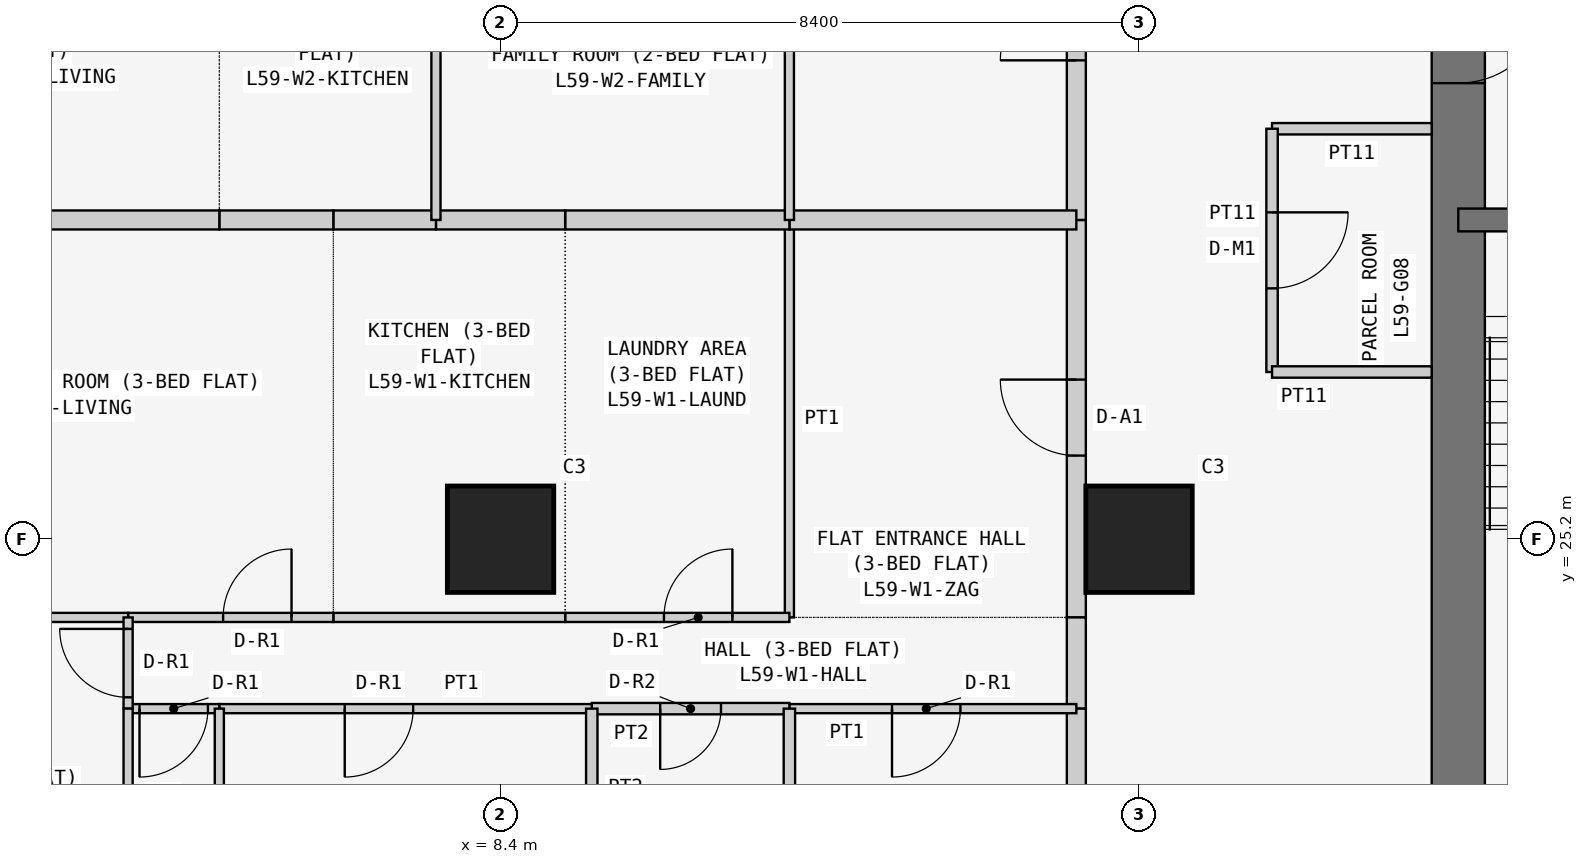
"""IFC4 building model, lengths in metres.
Left out: names, types, materials, properties, quantities, classifications, styles, units other than length and angle.
Written with IfcOpenShell. Run it as: python <this file> out.ifc"""

import sys

from ifc_helpers import new_model, si_unit, direction, frame, frame_2d, origin, origin_2d, place, context, subcontext, project, spatial, rectangle, extrude, element, fill, save


model = new_model("IFC4")
c1 = context("Model", 3, precision=1e-05, world=origin(), true_north=direction((0.0, 1.0)))
c2 = subcontext(c1, "Body", "Model", "MODEL_VIEW")
j1 = project(units=[si_unit("LENGTHUNIT", "METRE"), si_unit("PLANEANGLEUNIT", "RADIAN")], contexts=[c1])
p1 = place(None, origin())
s1 = spatial("IfcSite", under=j1, at=p1, CompositionType="ELEMENT")
p2 = place(p1, origin())
s2 = spatial("IfcBuilding", under=s1, at=p2, CompositionType="ELEMENT")
p3 = place(p2, frame((0.0, 0.0, 226.5)))
s3 = spatial("IfcBuildingStorey", under=s2, at=p3, CompositionType="ELEMENT", Elevation=226.5)
for number, where, z_axis, x_axis in (
    (1, (8.4, 25.2, 0.0), (0.0, 0.0, 1.0), (1.0, 0.0, 0.0)),
    (2, (16.8, 25.2, 0.0), (0.0, 0.0, 1.0), (1.0, 0.0, 0.0)),
):
    element("IfcColumn", number, at=place(p3, frame(where, z_axis=z_axis, x_axis=x_axis)), inside=s3, PredefinedType="COLUMN", context=c2, shape_type="SweptSolid", body=[
        extrude(rectangle(XDim=1.4, YDim=1.4, at=origin_2d()), origin(), (0.0, 0.0, 1.0), 3.6),
    ])
p4 = place(p3, frame((21.0, 37.8, 0.0), z_axis=(0.0, 0.0, 1.0), x_axis=(0.0, -1.0, 0.0)))
e3 = element("IfcWall", 3, at=p4, inside=s3, PredefinedType="SHEAR", context=c2, shape_type="SweptSolid", body=[
    extrude(rectangle(XDim=17.15, YDim=0.7, at=frame_2d((8.575, 0.0))), origin(), (0.0, 0.0, 1.0), 3.6),
])
p5 = place(p4, frame((5.4, 0.0, 0.0)))
e4 = element("IfcOpeningElement", 4, at=p5, cuts=e3, PredefinedType="OPENING", context=c2, shape_type="SweptSolid", body=[
    extrude(rectangle(XDim=1.2, YDim=2.1, at=frame_2d((0.6, 1.05))), frame((0.0, 0.36, 0.0), z_axis=(0.0, -1.0, 0.0), x_axis=(1.0, 0.0, 0.0)), (0.0, 0.0, 1.0), 0.72),
])
p6 = place(p3, frame((21.0, 29.4, 0.0), z_axis=(0.0, 0.0, 1.0), x_axis=(1.0, 0.0, 0.0)))
e5 = element("IfcWall", 5, at=p6, inside=s3, PredefinedType="SHEAR", context=c2, shape_type="SweptSolid", body=[
    extrude(rectangle(XDim=5.6, YDim=0.3, at=frame_2d((2.8, 0.0))), origin(), (0.0, 0.0, 1.0), 3.6),
])
p7 = place(p6, frame((2.3, 0.0, 0.0)))
e6 = element("IfcOpeningElement", 6, at=p7, cuts=e5, PredefinedType="OPENING", context=c2, shape_type="SweptSolid", body=[
    extrude(rectangle(XDim=1.2, YDim=2.1, at=frame_2d((0.6, 1.05))), frame((0.0, 0.16, 0.0), z_axis=(0.0, -1.0, 0.0), x_axis=(1.0, 0.0, 0.0)), (0.0, 0.0, 1.0), 0.32),
])
p8 = place(p3, frame((20.65, 30.6, 0.0), z_axis=(0.0, 0.0, 1.0), x_axis=(-1.0, 0.0, 0.0)))
e7 = element("IfcWall", 7, at=p8, inside=s3, PredefinedType="PARTITIONING", context=c2, shape_type="SweptSolid", body=[
    extrude(rectangle(XDim=2.1, YDim=0.15, at=frame_2d((1.05, 0.0))), origin(), (0.0, 0.0, 1.0), 3.45),
])
p9 = place(p3, frame((18.55, 30.6, 0.0), z_axis=(0.0, 0.0, 1.0), x_axis=(0.0, -1.0, 0.0)))
e8 = element("IfcWall", 8, at=p9, inside=s3, PredefinedType="PARTITIONING", context=c2, shape_type="SweptSolid", body=[
    extrude(rectangle(XDim=3.2, YDim=0.15, at=frame_2d((1.6, 0.0))), origin(), (0.0, 0.0, 1.0), 3.45),
])
p10 = place(p9, frame((1.1, 0.0, 0.0)))
e9 = element("IfcOpeningElement", 9, at=p10, cuts=e8, PredefinedType="OPENING", context=c2, shape_type="SweptSolid", body=[
    extrude(rectangle(XDim=1.0, YDim=2.1, at=frame_2d((0.5, 1.05))), frame((0.0, 0.085, 0.0), z_axis=(0.0, -1.0, 0.0), x_axis=(1.0, 0.0, 0.0)), (0.0, 0.0, 1.0), 0.17),
])
p11 = place(p3, frame((18.55, 27.4, 0.0), z_axis=(0.0, 0.0, 1.0), x_axis=(1.0, 0.0, 0.0)))
e10 = element("IfcWall", 10, at=p11, inside=s3, PredefinedType="PARTITIONING", context=c2, shape_type="SweptSolid", body=[
    extrude(rectangle(XDim=2.1, YDim=0.15, at=frame_2d((1.05, 0.0))), origin(), (0.0, 0.0, 1.0), 3.45),
])
p12 = place(p3, frame((15.975, 24.171, 0.0), z_axis=(0.0, 0.0, 1.0), x_axis=(0.0, 1.0, 0.0)))
e11 = element("IfcWall", 11, at=p12, inside=s3, PredefinedType="PARTITIONING", context=c2, shape_type="SweptSolid", body=[
    extrude(rectangle(XDim=5.229, YDim=0.25, at=frame_2d((2.615, 0.0))), origin(), (0.0, 0.0, 1.0), 3.45),
])
p13 = place(p12, frame((2.129, 0.0, 0.0)))
e12 = element("IfcOpeningElement", 12, at=p13, cuts=e11, PredefinedType="OPENING", context=c2, shape_type="SweptSolid", body=[
    extrude(rectangle(XDim=1.0, YDim=2.1, at=frame_2d((0.5, 1.05))), frame((0.0, 0.135, 0.0), z_axis=(0.0, -1.0, 0.0), x_axis=(1.0, 0.0, 0.0)), (0.0, 0.0, 1.0), 0.27),
])
p14 = place(p3, frame((15.975, 22.971, 0.0), z_axis=(0.0, 0.0, 1.0), x_axis=(0.0, 1.0, 0.0)))
e13 = element("IfcWall", 13, at=p14, inside=s3, PredefinedType="PARTITIONING", context=c2, shape_type="SweptSolid", body=[
    extrude(rectangle(XDim=1.2, YDim=0.25, at=frame_2d((0.6, 0.0))), origin(), (0.0, 0.0, 1.0), 3.45),
])
p15 = place(p3, frame((15.975, 16.1, 0.0), z_axis=(0.0, 0.0, 1.0), x_axis=(0.0, 1.0, 0.0)))
e14 = element("IfcWall", 14, at=p15, inside=s3, PredefinedType="PARTITIONING", context=c2, shape_type="SweptSolid", body=[
    extrude(rectangle(XDim=6.871, YDim=0.25, at=frame_2d((3.436, 0.0))), origin(), (0.0, 0.0, 1.0), 3.45),
])
p16 = place(p3, frame((15.975, 29.4, 0.0), z_axis=(0.0, 0.0, 1.0), x_axis=(0.0, 1.0, 0.0)))
e15 = element("IfcWall", 15, at=p16, inside=s3, PredefinedType="PARTITIONING", context=c2, shape_type="SweptSolid", body=[
    extrude(rectangle(XDim=5.229, YDim=0.25, at=frame_2d((2.615, 0.0))), origin(), (0.0, 0.0, 1.0), 3.45),
])
p17 = place(p16, frame((2.1, 0.0, 0.0)))
e16 = element("IfcOpeningElement", 16, at=p17, cuts=e15, PredefinedType="OPENING", context=c2, shape_type="SweptSolid", body=[
    extrude(rectangle(XDim=1.0, YDim=2.1, at=frame_2d((0.5, 1.05))), frame((0.0, 0.135, 0.0), z_axis=(0.0, -1.0, 0.0), x_axis=(1.0, 0.0, 0.0)), (0.0, 0.0, 1.0), 0.27),
])
p18 = place(p3, frame((12.2, 29.4, 0.0), z_axis=(0.0, 0.0, 1.0), x_axis=(0.0, -1.0, 0.0)))
e17 = element("IfcWall", 17, at=p18, inside=s3, PredefinedType="PARTITIONING", context=c2, shape_type="SweptSolid", body=[
    extrude(rectangle(XDim=5.229, YDim=0.12, at=frame_2d((2.615, 0.0))), origin(), (0.0, 0.0, 1.0), 3.45),
])
p19 = place(p3, frame((15.975, 29.4, 0.0), z_axis=(0.0, 0.0, 1.0), x_axis=(-1.0, 0.0, 0.0)))
e18 = element("IfcWall", 18, at=p19, inside=s3, PredefinedType="PARTITIONING", context=c2, shape_type="SweptSolid", body=[
    extrude(rectangle(XDim=3.775, YDim=0.25, at=frame_2d((1.888, 0.0))), origin(), (0.0, 0.0, 1.0), 3.45),
])
p20 = place(p3, frame((9.25, 24.171, 0.0), z_axis=(0.0, 0.0, 1.0), x_axis=(1.0, 0.0, 0.0)))
e19 = element("IfcWall", 19, at=p20, inside=s3, PredefinedType="PARTITIONING", context=c2, shape_type="SweptSolid", body=[
    extrude(rectangle(XDim=2.95, YDim=0.12, at=frame_2d((1.475, 0.0))), origin(), (0.0, 0.0, 1.0), 3.45),
])
p21 = place(p20, frame((1.3, 0.0, 0.0)))
e20 = element("IfcOpeningElement", 20, at=p21, cuts=e19, PredefinedType="OPENING", context=c2, shape_type="SweptSolid", body=[
    extrude(rectangle(XDim=0.9, YDim=2.1, at=frame_2d((0.45, 1.05))), frame((0.0, 0.07, 0.0), z_axis=(0.0, -1.0, 0.0), x_axis=(1.0, 0.0, 0.0)), (0.0, 0.0, 1.0), 0.14),
])
p22 = place(p3, frame((12.2, 29.4, 0.0), z_axis=(0.0, 0.0, 1.0), x_axis=(-1.0, 0.0, 0.0)))
e21 = element("IfcWall", 21, at=p22, inside=s3, PredefinedType="PARTITIONING", context=c2, shape_type="SweptSolid", body=[
    extrude(rectangle(XDim=2.95, YDim=0.25, at=frame_2d((1.475, 0.0))), origin(), (0.0, 0.0, 1.0), 3.45),
])
p23 = place(p3, frame((6.2, 24.171, 0.0), z_axis=(0.0, 0.0, 1.0), x_axis=(1.0, 0.0, 0.0)))
e22 = element("IfcWall", 22, at=p23, inside=s3, PredefinedType="PARTITIONING", context=c2, shape_type="SweptSolid", body=[
    extrude(rectangle(XDim=3.05, YDim=0.12, at=frame_2d((1.525, 0.0))), origin(), (0.0, 0.0, 1.0), 3.45),
])
p24 = place(p3, frame((9.25, 29.4, 0.0), z_axis=(0.0, 0.0, 1.0), x_axis=(-1.0, 0.0, 0.0)))
e23 = element("IfcWall", 23, at=p24, inside=s3, PredefinedType="PARTITIONING", context=c2, shape_type="SweptSolid", body=[
    extrude(rectangle(XDim=1.7, YDim=0.25, at=frame_2d((0.85, 0.0))), origin(), (0.0, 0.0, 1.0), 3.45),
])
p25 = place(p3, frame((7.55, 29.4, 0.0), z_axis=(0.0, 0.0, 1.0), x_axis=(-1.0, 0.0, 0.0)))
e24 = element("IfcWall", 24, at=p25, inside=s3, PredefinedType="PARTITIONING", context=c2, shape_type="SweptSolid", body=[
    extrude(rectangle(XDim=1.35, YDim=0.25, at=frame_2d((0.675, 0.0))), origin(), (0.0, 0.0, 1.0), 3.45),
])
p26 = place(p3, frame((3.5, 24.171, 0.0), z_axis=(0.0, 0.0, 1.0), x_axis=(1.0, 0.0, 0.0)))
e25 = element("IfcWall", 25, at=p26, inside=s3, PredefinedType="PARTITIONING", context=c2, shape_type="SweptSolid", body=[
    extrude(rectangle(XDim=2.7, YDim=0.12, at=frame_2d((1.35, 0.0))), origin(), (0.0, 0.0, 1.0), 3.45),
])
p27 = place(p26, frame((1.25, 0.0, 0.0)))
e26 = element("IfcOpeningElement", 26, at=p27, cuts=e25, PredefinedType="OPENING", context=c2, shape_type="SweptSolid", body=[
    extrude(rectangle(XDim=0.9, YDim=2.1, at=frame_2d((0.45, 1.05))), frame((0.0, 0.07, 0.0), z_axis=(0.0, -1.0, 0.0), x_axis=(1.0, 0.0, 0.0)), (0.0, 0.0, 1.0), 0.14),
])
p28 = place(p3, frame((-0.65, 24.171, 0.0), z_axis=(0.0, 0.0, 1.0), x_axis=(1.0, 0.0, 0.0)))
e27 = element("IfcWall", 27, at=p28, inside=s3, PredefinedType="PARTITIONING", context=c2, shape_type="SweptSolid", body=[
    extrude(rectangle(XDim=4.15, YDim=0.12, at=frame_2d((2.075, 0.0))), origin(), (0.0, 0.0, 1.0), 3.45),
])
p29 = place(p3, frame((6.2, 29.4, 0.0), z_axis=(0.0, 0.0, 1.0), x_axis=(-1.0, 0.0, 0.0)))
e28 = element("IfcWall", 28, at=p29, inside=s3, PredefinedType="PARTITIONING", context=c2, shape_type="SweptSolid", body=[
    extrude(rectangle(XDim=1.5, YDim=0.25, at=frame_2d((0.75, 0.0))), origin(), (0.0, 0.0, 1.0), 3.45),
])
p30 = place(p3, frame((4.7, 29.4, 0.0), z_axis=(0.0, 0.0, 1.0), x_axis=(-1.0, 0.0, 0.0)))
e29 = element("IfcWall", 29, at=p30, inside=s3, PredefinedType="PARTITIONING", context=c2, shape_type="SweptSolid", body=[
    extrude(rectangle(XDim=5.35, YDim=0.25, at=frame_2d((2.675, 0.0))), origin(), (0.0, 0.0, 1.0), 3.45),
])
p31 = place(p3, frame((12.2, 22.971, 0.0), z_axis=(0.0, 0.0, 1.0), x_axis=(1.0, 0.0, 0.0)))
e30 = element("IfcWall", 30, at=p31, inside=s3, PredefinedType="PARTITIONING", context=c2, shape_type="SweptSolid", body=[
    extrude(rectangle(XDim=3.775, YDim=0.12, at=frame_2d((1.888, 0.0))), origin(), (0.0, 0.0, 1.0), 3.45),
])
p32 = place(p31, frame((1.35, 0.0, 0.0)))
e31 = element("IfcOpeningElement", 31, at=p32, cuts=e30, PredefinedType="OPENING", context=c2, shape_type="SweptSolid", body=[
    extrude(rectangle(XDim=0.9, YDim=2.1, at=frame_2d((0.45, 1.05))), frame((0.0, 0.07, 0.0), z_axis=(0.0, -1.0, 0.0), x_axis=(1.0, 0.0, 0.0)), (0.0, 0.0, 1.0), 0.14),
])
p33 = place(p3, frame((9.6, 22.971, 0.0), z_axis=(0.0, 0.0, 1.0), x_axis=(1.0, 0.0, 0.0)))
e32 = element("IfcWall", 32, at=p33, inside=s3, PredefinedType="PARTITIONING", context=c2, shape_type="SweptSolid", body=[
    extrude(rectangle(XDim=2.6, YDim=0.15, at=frame_2d((1.3, 0.0))), origin(), (0.0, 0.0, 1.0), 3.45),
])
p34 = place(p33, frame((0.9, 0.0, 0.0)))
e33 = element("IfcOpeningElement", 33, at=p34, cuts=e32, PredefinedType="OPENING", context=c2, shape_type="SweptSolid", body=[
    extrude(rectangle(XDim=0.8, YDim=2.1, at=frame_2d((0.4, 1.05))), frame((0.0, 0.085, 0.0), z_axis=(0.0, -1.0, 0.0), x_axis=(1.0, 0.0, 0.0)), (0.0, 0.0, 1.0), 0.17),
])
p35 = place(p3, frame((4.7, 22.971, 0.0), z_axis=(0.0, 0.0, 1.0), x_axis=(1.0, 0.0, 0.0)))
e34 = element("IfcWall", 34, at=p35, inside=s3, PredefinedType="PARTITIONING", context=c2, shape_type="SweptSolid", body=[
    extrude(rectangle(XDim=4.9, YDim=0.12, at=frame_2d((2.45, 0.0))), origin(), (0.0, 0.0, 1.0), 3.45),
])
p36 = place(p35, frame((1.65, 0.0, 0.0)))
e35 = element("IfcOpeningElement", 35, at=p36, cuts=e34, PredefinedType="OPENING", context=c2, shape_type="SweptSolid", body=[
    extrude(rectangle(XDim=0.9, YDim=2.1, at=frame_2d((0.45, 1.05))), frame((0.0, 0.07, 0.0), z_axis=(0.0, -1.0, 0.0), x_axis=(1.0, 0.0, 0.0)), (0.0, 0.0, 1.0), 0.14),
])
p37 = place(p3, frame((3.5, 22.971, 0.0), z_axis=(0.0, 0.0, 1.0), x_axis=(1.0, 0.0, 0.0)))
e36 = element("IfcWall", 36, at=p37, inside=s3, PredefinedType="PARTITIONING", context=c2, shape_type="SweptSolid", body=[
    extrude(rectangle(XDim=1.2, YDim=0.12, at=frame_2d((0.6, 0.0))), origin(), (0.0, 0.0, 1.0), 3.45),
])
p38 = place(p37, frame((0.15, 0.0, 0.0)))
e37 = element("IfcOpeningElement", 37, at=p38, cuts=e36, PredefinedType="OPENING", context=c2, shape_type="SweptSolid", body=[
    extrude(rectangle(XDim=0.9, YDim=2.1, at=frame_2d((0.45, 1.05))), frame((0.0, 0.07, 0.0), z_axis=(0.0, -1.0, 0.0), x_axis=(1.0, 0.0, 0.0)), (0.0, 0.0, 1.0), 0.14),
])
p39 = place(p3, frame((3.5, 24.171, 0.0), z_axis=(0.0, 0.0, 1.0), x_axis=(0.0, -1.0, 0.0)))
e38 = element("IfcWall", 38, at=p39, inside=s3, PredefinedType="PARTITIONING", context=c2, shape_type="SweptSolid", body=[
    extrude(rectangle(XDim=1.2, YDim=0.12, at=frame_2d((0.6, 0.0))), origin(), (0.0, 0.0, 1.0), 3.45),
])
p40 = place(p39, frame((0.151, 0.0, 0.0)))
e39 = element("IfcOpeningElement", 39, at=p40, cuts=e38, PredefinedType="OPENING", context=c2, shape_type="SweptSolid", body=[
    extrude(rectangle(XDim=0.9, YDim=2.1, at=frame_2d((0.45, 1.05))), frame((0.0, 0.07, 0.0), z_axis=(0.0, -1.0, 0.0), x_axis=(1.0, 0.0, 0.0)), (0.0, 0.0, 1.0), 0.14),
])
for number, where, z_axis, x_axis in (
    (40, (12.2, 22.971, 0.0), (0.0, 0.0, 1.0), (0.0, -1.0, 0.0)),
    (41, (9.6, 22.971, 0.0), (0.0, 0.0, 1.0), (0.0, -1.0, 0.0)),
):
    element("IfcWall", number, at=place(p3, frame(where, z_axis=z_axis, x_axis=x_axis)), inside=s3, PredefinedType="PARTITIONING", context=c2, shape_type="SweptSolid", body=[
        extrude(rectangle(XDim=2.971, YDim=0.15, at=frame_2d((1.485, 0.0))), origin(), (0.0, 0.0, 1.0), 3.45),
    ])
for number, where, z_axis, x_axis in (
    (42, (4.7, 22.971, 0.0), (0.0, 0.0, 1.0), (0.0, -1.0, 0.0)),
    (43, (3.5, 22.971, 0.0), (0.0, 0.0, 1.0), (0.0, -1.0, 0.0)),
):
    element("IfcWall", number, at=place(p3, frame(where, z_axis=z_axis, x_axis=x_axis)), inside=s3, PredefinedType="PARTITIONING", context=c2, shape_type="SweptSolid", body=[
        extrude(rectangle(XDim=2.285, YDim=0.12, at=frame_2d((1.143, 0.0))), origin(), (0.0, 0.0, 1.0), 3.45),
    ])
for number, where, z_axis, x_axis in (
    (44, (12.2, 29.4, 0.0), (0.0, 0.0, 1.0), (0.0, 1.0, 0.0)),
    (45, (7.55, 29.4, 0.0), (0.0, 0.0, 1.0), (0.0, 1.0, 0.0)),
):
    element("IfcWall", number, at=place(p3, frame(where, z_axis=z_axis, x_axis=x_axis)), inside=s3, PredefinedType="PARTITIONING", context=c2, shape_type="SweptSolid", body=[
        extrude(rectangle(XDim=5.229, YDim=0.12, at=frame_2d((2.615, 0.0))), origin(), (0.0, 0.0, 1.0), 3.45),
    ])
p41 = place(p10, origin())
e46 = element("IfcDoor", 46, at=p41, inside=s3, OperationType="SINGLE_SWING_LEFT", PredefinedType="DOOR", context=c2, shape_type="SweptSolid", body=[
    extrude(rectangle(XDim=1.0, YDim=2.1, at=frame_2d((0.5, 1.05))), frame((0.0, 0.025, 0.0), z_axis=(0.0, -1.0, 0.0), x_axis=(1.0, 0.0, 0.0)), (0.0, 0.0, 1.0), 0.05),
])
fill(e9, e46)
p42 = place(p13, origin())
e47 = element("IfcDoor", 47, at=p42, inside=s3, OperationType="SINGLE_SWING_RIGHT", PredefinedType="DOOR", context=c2, shape_type="SweptSolid", body=[
    extrude(rectangle(XDim=1.0, YDim=2.1, at=frame_2d((0.5, 1.05))), frame((0.0, 0.025, 0.0), z_axis=(0.0, -1.0, 0.0), x_axis=(1.0, 0.0, 0.0)), (0.0, 0.0, 1.0), 0.05),
])
fill(e12, e47)
p43 = place(p21, origin())
e48 = element("IfcDoor", 48, at=p43, inside=s3, OperationType="SINGLE_SWING_RIGHT", PredefinedType="DOOR", context=c2, shape_type="SweptSolid", body=[
    extrude(rectangle(XDim=0.9, YDim=2.1, at=frame_2d((0.45, 1.05))), frame((0.0, 0.025, 0.0), z_axis=(0.0, -1.0, 0.0), x_axis=(1.0, 0.0, 0.0)), (0.0, 0.0, 1.0), 0.05),
])
fill(e20, e48)
p44 = place(p27, origin())
e49 = element("IfcDoor", 49, at=p44, inside=s3, OperationType="SINGLE_SWING_RIGHT", PredefinedType="DOOR", context=c2, shape_type="SweptSolid", body=[
    extrude(rectangle(XDim=0.9, YDim=2.1, at=frame_2d((0.45, 1.05))), frame((0.0, 0.025, 0.0), z_axis=(0.0, -1.0, 0.0), x_axis=(1.0, 0.0, 0.0)), (0.0, 0.0, 1.0), 0.05),
])
fill(e26, e49)
p45 = place(p32, frame((0.9, 0.0, 0.0), z_axis=(0.0, 0.0, 1.0), x_axis=(-1.0, 0.0, 0.0)))
e50 = element("IfcDoor", 50, at=p45, inside=s3, OperationType="SINGLE_SWING_RIGHT", PredefinedType="DOOR", context=c2, shape_type="SweptSolid", body=[
    extrude(rectangle(XDim=0.9, YDim=2.1, at=frame_2d((0.45, 1.05))), frame((0.0, 0.025, 0.0), z_axis=(0.0, -1.0, 0.0), x_axis=(1.0, 0.0, 0.0)), (0.0, 0.0, 1.0), 0.05),
])
fill(e31, e50)
p46 = place(p34, frame((0.8, 0.0, 0.0), z_axis=(0.0, 0.0, 1.0), x_axis=(-1.0, 0.0, 0.0)))
e51 = element("IfcDoor", 51, at=p46, inside=s3, OperationType="SINGLE_SWING_RIGHT", PredefinedType="DOOR", context=c2, shape_type="SweptSolid", body=[
    extrude(rectangle(XDim=0.8, YDim=2.1, at=frame_2d((0.4, 1.05))), frame((0.0, 0.025, 0.0), z_axis=(0.0, -1.0, 0.0), x_axis=(1.0, 0.0, 0.0)), (0.0, 0.0, 1.0), 0.05),
])
fill(e33, e51)
p47 = place(p36, frame((0.9, 0.0, 0.0), z_axis=(0.0, 0.0, 1.0), x_axis=(-1.0, 0.0, 0.0)))
e52 = element("IfcDoor", 52, at=p47, inside=s3, OperationType="SINGLE_SWING_RIGHT", PredefinedType="DOOR", context=c2, shape_type="SweptSolid", body=[
    extrude(rectangle(XDim=0.9, YDim=2.1, at=frame_2d((0.45, 1.05))), frame((0.0, 0.025, 0.0), z_axis=(0.0, -1.0, 0.0), x_axis=(1.0, 0.0, 0.0)), (0.0, 0.0, 1.0), 0.05),
])
fill(e35, e52)
p48 = place(p38, frame((0.9, 0.0, 0.0), z_axis=(0.0, 0.0, 1.0), x_axis=(-1.0, 0.0, 0.0)))
e53 = element("IfcDoor", 53, at=p48, inside=s3, OperationType="SINGLE_SWING_RIGHT", PredefinedType="DOOR", context=c2, shape_type="SweptSolid", body=[
    extrude(rectangle(XDim=0.9, YDim=2.1, at=frame_2d((0.45, 1.05))), frame((0.0, 0.025, 0.0), z_axis=(0.0, -1.0, 0.0), x_axis=(1.0, 0.0, 0.0)), (0.0, 0.0, 1.0), 0.05),
])
fill(e37, e53)
p49 = place(p40, frame((0.9, 0.0, 0.0), z_axis=(0.0, 0.0, 1.0), x_axis=(-1.0, 0.0, 0.0)))
e54 = element("IfcDoor", 54, at=p49, inside=s3, OperationType="SINGLE_SWING_RIGHT", PredefinedType="DOOR", context=c2, shape_type="SweptSolid", body=[
    extrude(rectangle(XDim=0.9, YDim=2.1, at=frame_2d((0.45, 1.05))), frame((0.0, 0.025, 0.0), z_axis=(0.0, -1.0, 0.0), x_axis=(1.0, 0.0, 0.0)), (0.0, 0.0, 1.0), 0.05),
])
fill(e39, e54)
p50 = place(p17, origin())
e55 = element("IfcDoor", 55, at=p50, inside=s3, OperationType="SINGLE_SWING_LEFT", PredefinedType="DOOR", context=c2, shape_type="SweptSolid", body=[
    extrude(rectangle(XDim=1.0, YDim=2.1, at=frame_2d((0.5, 1.05))), frame((0.0, 0.025, 0.0), z_axis=(0.0, -1.0, 0.0), x_axis=(1.0, 0.0, 0.0)), (0.0, 0.0, 1.0), 0.05),
])
fill(e16, e55)
p51 = place(p5, origin())
e56 = element("IfcDoor", 56, at=p51, inside=s3, OperationType="SINGLE_SWING_LEFT", PredefinedType="DOOR", context=c2, shape_type="SweptSolid", body=[
    extrude(rectangle(XDim=1.2, YDim=2.1, at=frame_2d((0.6, 1.05))), frame((0.0, 0.025, 0.0), z_axis=(0.0, -1.0, 0.0), x_axis=(1.0, 0.0, 0.0)), (0.0, 0.0, 1.0), 0.05),
])
fill(e4, e56)
save(model, sys.argv[1])
